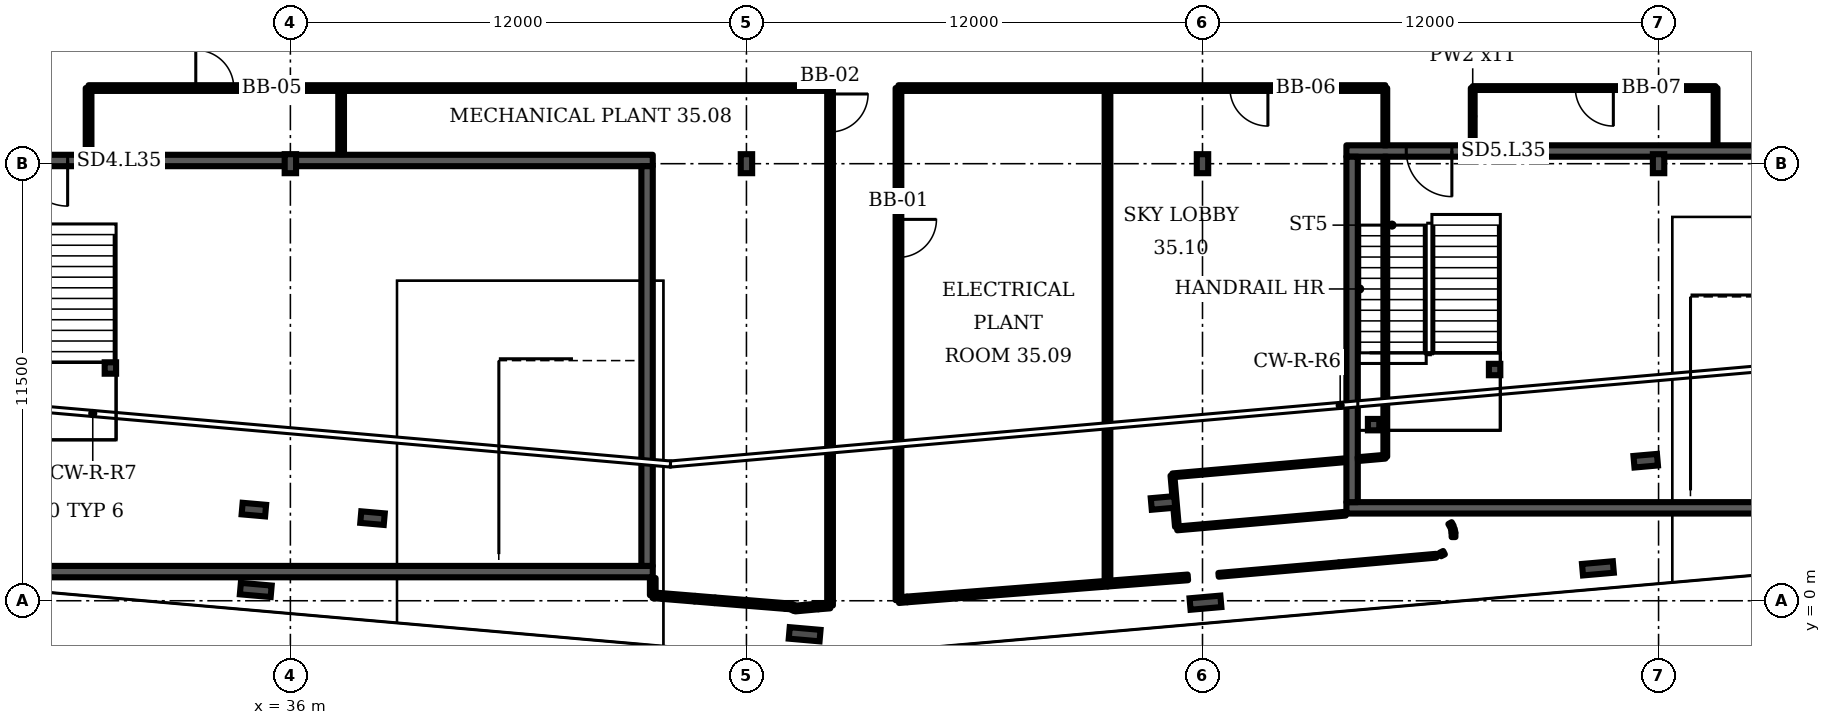
"""IFC4 building model, lengths in metres.
Left out: names, types, materials, properties, quantities, classifications, styles, units other than length and angle.
Written with IfcOpenShell. Run it as: python <this file> out.ifc"""

import sys

from ifc_helpers import new_model, si_unit, direction, frame, frame_2d, origin, origin_2d, place, context, subcontext, project, spatial, rectangle, i_section, extrude, element, fill, save


model = new_model("IFC4")
c1 = context("Model", 3, precision=1e-05, world=origin(), true_north=direction((0.0, 1.0)))
c2 = subcontext(c1, "Body", "Model", "MODEL_VIEW")
j1 = project(units=[si_unit("LENGTHUNIT", "METRE"), si_unit("PLANEANGLEUNIT", "RADIAN")], contexts=[c1])
p1 = place(None, origin())
s1 = spatial("IfcSite", under=j1, at=p1, CompositionType="ELEMENT")
p2 = place(p1, origin())
s2 = spatial("IfcBuilding", under=s1, at=p2, CompositionType="ELEMENT")
p3 = place(p2, frame((0.0, 0.0, 147.1)))
s3 = spatial("IfcBuildingStorey", under=s2, at=p3, CompositionType="ELEMENT", Elevation=147.1)
for number, where, z_axis, x_axis in (
    (1, (35.039, 2.399, 0.0), (0.0, 0.0, 1.0), (-0.087, -0.996, 0.0)),
    (2, (38.161, 2.174, 0.0), (0.0, 0.0, 1.0), (-0.087, -0.996, 0.0)),
    (3, (58.961, 2.573, 0.0), (0.0, 0.0, 1.0), (0.087, -0.996, 0.0)),
    (4, (71.662, 3.685, 0.0), (0.0, 0.0, 1.0), (0.087, -0.996, 0.0)),
):
    element("IfcColumn", number, at=place(p3, frame(where, z_axis=z_axis, x_axis=x_axis)), inside=s3, PredefinedType="COLUMN", context=c2, shape_type="SweptSolid", body=[
        extrude(i_section(OverallWidth=0.305, OverallDepth=0.62, WebThickness=0.021, FlangeThickness=0.04, FilletRadius=0.027, at=origin_2d()), origin(), (0.0, 0.0, 1.0), 4.8),
    ])
for number, where, z_axis, x_axis in (
    (5, (36.0, 11.5, 0.0), (0.0, 0.0, 1.0), (1.0, 0.0, 0.0)),
    (6, (48.0, 11.5, 0.0), (0.0, 0.0, 1.0), (1.0, 0.0, 0.0)),
    (7, (60.0, 11.5, 0.0), (0.0, 0.0, 1.0), (1.0, 0.0, 0.0)),
    (8, (72.0, 11.5, 0.0), (0.0, 0.0, 1.0), (1.0, 0.0, 0.0)),
):
    element("IfcColumn", number, at=place(p3, frame(where, z_axis=z_axis, x_axis=x_axis)), inside=s3, PredefinedType="COLUMN", context=c2, shape_type="SweptSolid", body=[
        extrude(i_section(OverallWidth=0.3, OverallDepth=0.5, WebThickness=0.014, FlangeThickness=0.028, FilletRadius=0.027, at=origin_2d()), origin(), (0.0, 0.0, 1.0), 4.8),
    ])
for number, where, z_axis, x_axis in (
    (9, (35.089, 0.285, 0.0), (0.0, 0.0, 1.0), (-0.087, -0.996, 0.0)),
    (10, (49.531, -0.882, 0.0), (0.0, 0.0, 1.0), (-0.087, -0.996, 0.0)),
    (11, (60.078, -0.051, 0.0), (0.0, 0.0, 1.0), (0.087, -0.996, 0.0)),
    (12, (70.404, 0.853, 0.0), (0.0, 0.0, 1.0), (0.087, -0.996, 0.0)),
):
    element("IfcColumn", number, at=place(p3, frame(where, z_axis=z_axis, x_axis=x_axis)), inside=s3, PredefinedType="COLUMN", context=c2, shape_type="SweptSolid", body=[
        extrude(i_section(OverallWidth=0.303, OverallDepth=0.814, WebThickness=0.021, FlangeThickness=0.04, FilletRadius=0.03, at=origin_2d()), origin(), (0.0, 0.0, 1.0), 4.8),
    ])
p4 = place(p3, frame((27.364, 11.584, 0.0), z_axis=(0.0, 0.0, 1.0), x_axis=(1.0, 0.0, 0.0)))
e13 = element("IfcWall", 13, at=p4, inside=s3, PredefinedType="SHEAR", context=c2, shape_type="SweptSolid", body=[
    extrude(rectangle(XDim=18.171, YDim=0.3, at=frame_2d((9.085, 0.0))), origin(), (0.0, 0.0, 1.0), 4.4),
])
p5 = place(p4, frame((1.575, 0.0, 0.0)))
e14 = element("IfcOpeningElement", 14, at=p5, cuts=e13, PredefinedType="OPENING", context=c2, shape_type="SweptSolid", body=[
    extrude(rectangle(XDim=1.2, YDim=2.1, at=frame_2d((0.6, 1.05))), frame((0.0, 0.16, 0.0), z_axis=(0.0, -1.0, 0.0), x_axis=(1.0, 0.0, 0.0)), (0.0, 0.0, 1.0), 0.32),
])
p6 = place(p3, frame((63.786, 11.834, 0.0), z_axis=(0.0, 0.0, 1.0), x_axis=(1.0, 0.0, 0.0)))
e15 = element("IfcWall", 15, at=p6, inside=s3, PredefinedType="SHEAR", context=c2, shape_type="SweptSolid", body=[
    extrude(rectangle(XDim=13.105, YDim=0.3, at=frame_2d((6.552, 0.0))), origin(), (0.0, 0.0, 1.0), 4.4),
])
p7 = place(p6, frame((1.575, 0.0, 0.0)))
e16 = element("IfcOpeningElement", 16, at=p7, cuts=e15, PredefinedType="OPENING", context=c2, shape_type="SweptSolid", body=[
    extrude(rectangle(XDim=1.2, YDim=2.1, at=frame_2d((0.6, 1.05))), frame((0.0, 0.16, 0.0), z_axis=(0.0, -1.0, 0.0), x_axis=(1.0, 0.0, 0.0)), (0.0, 0.0, 1.0), 0.32),
])
p8 = place(p3, frame((30.69, 11.754, 0.0), z_axis=(0.0, 0.0, 1.0), x_axis=(0.0, 1.0, 0.0)))
e17 = element("IfcWall", 17, at=p8, inside=s3, PredefinedType="PARTITIONING", context=c2, shape_type="SweptSolid", body=[
    extrude(rectangle(XDim=1.736, YDim=0.15, at=frame_2d((0.868, 0.0))), origin(), (0.0, 0.0, 1.0), 4.4),
])
p9 = place(p3, frame((30.69, 13.49, 0.0), z_axis=(0.0, 0.0, 1.0), x_axis=(1.0, 0.0, 0.0)))
e18 = element("IfcWall", 18, at=p9, inside=s3, PredefinedType="PARTITIONING", context=c2, shape_type="SweptSolid", body=[
    extrude(rectangle(XDim=19.51, YDim=0.15, at=frame_2d((9.755, 0.0))), origin(), (0.0, 0.0, 1.0), 4.4),
])
p10 = place(p9, frame((2.821, 0.0, 0.0)))
e19 = element("IfcOpeningElement", 19, at=p10, cuts=e18, PredefinedType="OPENING", context=c2, shape_type="SweptSolid", body=[
    extrude(rectangle(XDim=1.0, YDim=2.1, at=frame_2d((0.5, 1.05))), frame((0.0, 0.085, 0.0), z_axis=(0.0, -1.0, 0.0), x_axis=(1.0, 0.0, 0.0)), (0.0, 0.0, 1.0), 0.17),
])
p11 = place(p3, frame((37.335, 11.754, 0.0), z_axis=(0.0, 0.0, 1.0), x_axis=(0.0, 1.0, 0.0)))
e20 = element("IfcWall", 20, at=p11, inside=s3, PredefinedType="PARTITIONING", context=c2, shape_type="SweptSolid", body=[
    extrude(rectangle(XDim=1.736, YDim=0.15, at=frame_2d((0.868, 0.0))), origin(), (0.0, 0.0, 1.0), 4.4),
])
p12 = place(p3, frame((45.535, 0.145, 0.0), z_axis=(0.0, 0.0, 1.0), x_axis=(0.0, 1.0, 0.0)))
e21 = element("IfcWall", 21, at=p12, inside=s3, PredefinedType="PARTITIONING", context=c2, shape_type="SweptSolid", body=[
    extrude(rectangle(XDim=0.452, YDim=0.15, at=frame_2d((0.226, 0.0))), origin(), (0.0, 0.0, 1.0), 4.4),
])
p13 = place(p3, frame((46.64, 0.055, 0.0), z_axis=(0.0, 0.0, 1.0), x_axis=(-0.996689, 0.081259, 0.0)))
e22 = element("IfcWall", 22, at=p13, inside=s3, PredefinedType="PARTITIONING", context=c2, shape_type="SweptSolid", body=[
    extrude(rectangle(XDim=1.109, YDim=0.15, at=frame_2d((0.554, 0.0))), origin(), (0.0, 0.0, 1.0), 4.4),
])
p14 = place(p3, frame((47.169, 0.011, 0.0), z_axis=(0.0, 0.0, 1.0), x_axis=(-0.99664, 0.081903, 0.0)))
e23 = element("IfcWall", 23, at=p14, inside=s3, PredefinedType="PARTITIONING", context=c2, shape_type="SweptSolid", body=[
    extrude(rectangle(XDim=0.531, YDim=0.15, at=frame_2d((0.265, 0.0))), origin(), (0.0, 0.0, 1.0), 4.4),
])
p15 = place(p3, frame((49.027, -0.139, 0.0), z_axis=(0.0, 0.0, 1.0), x_axis=(-0.996757, 0.080521, 0.0)))
e24 = element("IfcWall", 24, at=p15, inside=s3, PredefinedType="PARTITIONING", context=c2, shape_type="SweptSolid", body=[
    extrude(rectangle(XDim=1.865, YDim=0.15, at=frame_2d((0.932, 0.0))), origin(), (0.0, 0.0, 1.0), 4.4),
])
p16 = place(p3, frame((49.18, -0.15, 0.0), z_axis=(0.0, 0.0, 1.0), x_axis=(-0.997298, 0.073401, 0.0)))
e25 = element("IfcWall", 25, at=p16, inside=s3, PredefinedType="PARTITIONING", context=c2, shape_type="SweptSolid", body=[
    extrude(rectangle(XDim=0.153, YDim=0.15, at=frame_2d((0.077, 0.0))), origin(), (0.0, 0.0, 1.0), 4.4),
])
p17 = place(p3, frame((49.28, -0.205, 0.0), z_axis=(0.0, 0.0, 1.0), x_axis=(-0.884675, 0.466217, 0.0)))
e26 = element("IfcWall", 26, at=p17, inside=s3, PredefinedType="PARTITIONING", context=c2, shape_type="SweptSolid", body=[
    extrude(rectangle(XDim=0.107, YDim=0.15, at=frame_2d((0.054, 0.0))), origin(), (0.0, 0.0, 1.0), 4.4),
])
p18 = place(p3, frame((49.28, -0.205, 0.0), z_axis=(0.0, 0.0, 1.0), x_axis=(0.995928, 0.090104, 0.0)))
e27 = element("IfcWall", 27, at=p18, inside=s3, PredefinedType="PARTITIONING", context=c2, shape_type="SweptSolid", body=[
    extrude(rectangle(XDim=0.612, YDim=0.15, at=frame_2d((0.306, 0.0))), origin(), (0.0, 0.0, 1.0), 4.4),
])
p19 = place(p3, frame((49.89, -0.15, 0.0), z_axis=(0.0, 0.0, 1.0), x_axis=(0.996788, 0.080057, 0.0)))
e28 = element("IfcWall", 28, at=p19, inside=s3, PredefinedType="PARTITIONING", context=c2, shape_type="SweptSolid", body=[
    extrude(rectangle(XDim=0.311, YDim=0.15, at=frame_2d((0.156, 0.0))), origin(), (0.0, 0.0, 1.0), 4.4),
])
p20 = place(p3, frame((50.2, -0.125, 0.0), z_axis=(0.0, 0.0, 1.0), x_axis=(0.0, 1.0, 0.0)))
e29 = element("IfcWall", 29, at=p20, inside=s3, PredefinedType="PARTITIONING", context=c2, shape_type="SweptSolid", body=[
    extrude(rectangle(XDim=13.615, YDim=0.15, at=frame_2d((6.808, 0.0))), origin(), (0.0, 0.0, 1.0), 4.4),
])
p21 = place(p20, frame((12.459, 0.0, 0.0)))
e30 = element("IfcOpeningElement", 30, at=p21, cuts=e29, PredefinedType="OPENING", context=c2, shape_type="SweptSolid", body=[
    extrude(rectangle(XDim=1.0, YDim=2.1, at=frame_2d((0.5, 1.05))), frame((0.0, 0.085, 0.0), z_axis=(0.0, -1.0, 0.0), x_axis=(1.0, 0.0, 0.0)), (0.0, 0.0, 1.0), 0.17),
])
p22 = place(p3, frame((52.0, 0.015, 0.0), z_axis=(0.0, 0.0, 1.0), x_axis=(0.0, 1.0, 0.0)))
e31 = element("IfcWall", 31, at=p22, inside=s3, PredefinedType="PARTITIONING", context=c2, shape_type="SweptSolid", body=[
    extrude(rectangle(XDim=13.475, YDim=0.15, at=frame_2d((6.737, 0.0))), origin(), (0.0, 0.0, 1.0), 4.4),
])
p23 = place(p22, frame((9.02, 0.0, 0.0)))
e32 = element("IfcOpeningElement", 32, at=p23, cuts=e31, PredefinedType="OPENING", context=c2, shape_type="SweptSolid", body=[
    extrude(rectangle(XDim=1.0, YDim=2.1, at=frame_2d((0.5, 1.05))), frame((0.0, 0.085, 0.0), z_axis=(0.0, -1.0, 0.0), x_axis=(1.0, 0.0, 0.0)), (0.0, 0.0, 1.0), 0.17),
])
p24 = place(p3, frame((52.0, 13.49, 0.0), z_axis=(0.0, 0.0, 1.0), x_axis=(1.0, 0.0, 0.0)))
e33 = element("IfcWall", 33, at=p24, inside=s3, PredefinedType="PARTITIONING", context=c2, shape_type="SweptSolid", body=[
    extrude(rectangle(XDim=12.81, YDim=0.15, at=frame_2d((6.405, 0.0))), origin(), (0.0, 0.0, 1.0), 4.4),
])
p25 = place(p24, frame((8.721, 0.0, 0.0)))
e34 = element("IfcOpeningElement", 34, at=p25, cuts=e33, PredefinedType="OPENING", context=c2, shape_type="SweptSolid", body=[
    extrude(rectangle(XDim=1.0, YDim=2.1, at=frame_2d((0.5, 1.05))), frame((0.0, 0.085, 0.0), z_axis=(0.0, -1.0, 0.0), x_axis=(1.0, 0.0, 0.0)), (0.0, 0.0, 1.0), 0.17),
])
p26 = place(p3, frame((52.009, 0.016, 0.0), z_axis=(0.0, 0.0, 1.0), x_axis=(0.99631, 0.085775, 0.0)))
e35 = element("IfcWall", 35, at=p26, inside=s3, PredefinedType="PARTITIONING", context=c2, shape_type="SweptSolid", body=[
    extrude(rectangle(XDim=0.222, YDim=0.15, at=frame_2d((0.111, 0.0))), origin(), (0.0, 0.0, 1.0), 4.4),
])
p27 = place(p3, frame((52.23, 0.035, 0.0), z_axis=(0.0, 0.0, 1.0), x_axis=(0.996917, 0.078512, 0.0)))
e36 = element("IfcWall", 36, at=p27, inside=s3, PredefinedType="PARTITIONING", context=c2, shape_type="SweptSolid", body=[
    extrude(rectangle(XDim=5.286, YDim=0.15, at=frame_2d((2.643, 0.0))), origin(), (0.0, 0.0, 1.0), 4.4),
])
p28 = place(p3, frame((57.5, 0.45, 0.0), z_axis=(0.0, 0.0, 1.0), x_axis=(0.996965, 0.077796, 0.0)))
e37 = element("IfcWall", 37, at=p28, inside=s3, PredefinedType="PARTITIONING", context=c2, shape_type="SweptSolid", body=[
    extrude(rectangle(XDim=2.121, YDim=0.15, at=frame_2d((1.061, 0.0))), origin(), (0.0, 0.0, 1.0), 4.4),
])
p29 = place(p3, frame((57.5, 0.45, 0.0), z_axis=(0.0, 0.0, 1.0), x_axis=(0.0, 1.0, 0.0)))
e38 = element("IfcWall", 38, at=p29, inside=s3, PredefinedType="PARTITIONING", context=c2, shape_type="SweptSolid", body=[
    extrude(rectangle(XDim=13.04, YDim=0.15, at=frame_2d((6.52, 0.0))), origin(), (0.0, 0.0, 1.0), 4.4),
])
p30 = place(p3, frame((59.21, 3.3, 0.0), z_axis=(0.0, 0.0, 1.0), x_axis=(0.996195, 0.087113, 0.0)))
e39 = element("IfcWall", 39, at=p30, inside=s3, PredefinedType="PARTITIONING", context=c2, shape_type="SweptSolid", body=[
    extrude(rectangle(XDim=4.574, YDim=0.1, at=frame_2d((2.287, 0.0))), origin(), (0.0, 0.0, 1.0), 4.4),
])
p31 = place(p3, frame((59.327, 1.948, 0.0), z_axis=(0.0, 0.0, 1.0), x_axis=(-0.087221, 0.996193, 0.0)))
e40 = element("IfcWall", 40, at=p31, inside=s3, PredefinedType="PARTITIONING", context=c2, shape_type="SweptSolid", body=[
    extrude(rectangle(XDim=1.355, YDim=0.1, at=frame_2d((0.677, 0.0))), origin(), (0.0, 0.0, 1.0), 4.4),
])
p32 = place(p3, frame((59.331, 1.903, 0.0), z_axis=(0.0, 0.0, 1.0), x_axis=(0.996196, 0.087174, 0.0)))
e41 = element("IfcWall", 41, at=p32, inside=s3, PredefinedType="PARTITIONING", context=c2, shape_type="SweptSolid", body=[
    extrude(rectangle(XDim=4.453, YDim=0.1, at=frame_2d((2.227, 0.0))), origin(), (0.0, 0.0, 1.0), 4.4),
])
p33 = place(p3, frame((60.422, 0.682, 0.0), z_axis=(0.0, 0.0, 1.0), x_axis=(0.996194, 0.087143, 0.0)))
e42 = element("IfcWall", 42, at=p33, inside=s3, PredefinedType="PARTITIONING", context=c2, shape_type="SweptSolid", body=[
    extrude(rectangle(XDim=3.18, YDim=0.1, at=frame_2d((1.59, 0.0))), origin(), (0.0, 0.0, 1.0), 4.4),
])
p34 = place(p3, frame((63.59, 0.959, 0.0), z_axis=(0.0, 0.0, 1.0), x_axis=(0.996132, 0.08788, 0.0)))
e43 = element("IfcWall", 43, at=p34, inside=s3, PredefinedType="PARTITIONING", context=c2, shape_type="SweptSolid", body=[
    extrude(rectangle(XDim=2.57, YDim=0.1, at=frame_2d((1.285, 0.0))), origin(), (0.0, 0.0, 1.0), 4.4),
])
p35 = place(p3, frame((64.086, 3.727, 0.0), z_axis=(0.0, 0.0, 1.0), x_axis=(0.996178, 0.087384, 0.0)))
e44 = element("IfcWall", 44, at=p35, inside=s3, PredefinedType="PARTITIONING", context=c2, shape_type="SweptSolid", body=[
    extrude(rectangle(XDim=0.726, YDim=0.1, at=frame_2d((0.363, 0.0))), origin(), (0.0, 0.0, 1.0), 4.4),
])
p36 = place(p3, frame((64.81, 3.79, 0.0), z_axis=(0.0, 0.0, 1.0), x_axis=(0.0, 1.0, 0.0)))
e45 = element("IfcWall", 45, at=p36, inside=s3, PredefinedType="PARTITIONING", context=c2, shape_type="SweptSolid", body=[
    extrude(rectangle(XDim=7.894, YDim=0.1, at=frame_2d((3.947, 0.0))), origin(), (0.0, 0.0, 1.0), 4.4),
])
p37 = place(p3, frame((66.255, 1.215, 0.0), z_axis=(0.0, 0.0, 1.0), x_axis=(0.895295, 0.445464, 0.0)))
e46 = element("IfcWall", 46, at=p37, inside=s3, PredefinedType="PARTITIONING", context=c2, shape_type="SweptSolid", body=[
    extrude(rectangle(XDim=0.112, YDim=0.1, at=frame_2d((0.056, 0.0))), origin(), (0.0, 0.0, 1.0), 4.4),
])
p38 = place(p3, frame((66.565, 1.95, 0.0), z_axis=(0.0, 0.0, 1.0), x_axis=(-0.485062, 0.874478, 0.0)))
e47 = element("IfcWall", 47, at=p38, inside=s3, PredefinedType="PARTITIONING", context=c2, shape_type="SweptSolid", body=[
    extrude(rectangle(XDim=0.107, YDim=0.1, at=frame_2d((0.054, 0.0))), origin(), (0.0, 0.0, 1.0), 4.4),
])
p39 = place(p3, frame((66.605, 1.675, 0.0), z_axis=(0.0, 0.0, 1.0), x_axis=(0.0, 1.0, 0.0)))
e48 = element("IfcWall", 48, at=p39, inside=s3, PredefinedType="PARTITIONING", context=c2, shape_type="SweptSolid", body=[
    extrude(rectangle(XDim=0.11, YDim=0.1, at=frame_2d((0.055, 0.0))), origin(), (0.0, 0.0, 1.0), 4.4),
])
p40 = place(p3, frame((66.605, 1.785, 0.0), z_axis=(0.0, 0.0, 1.0), x_axis=(-0.178886, 0.983873, 0.0)))
e49 = element("IfcWall", 49, at=p40, inside=s3, PredefinedType="PARTITIONING", context=c2, shape_type="SweptSolid", body=[
    extrude(rectangle(XDim=0.112, YDim=0.1, at=frame_2d((0.056, 0.0))), origin(), (0.0, 0.0, 1.0), 4.4),
])
p41 = place(p3, frame((67.11, 12.004, 0.0), z_axis=(0.0, 0.0, 1.0), x_axis=(0.0, 1.0, 0.0)))
e50 = element("IfcWall", 50, at=p41, inside=s3, PredefinedType="PARTITIONING", context=c2, shape_type="SweptSolid", body=[
    extrude(rectangle(XDim=1.486, YDim=0.1, at=frame_2d((0.743, 0.0))), origin(), (0.0, 0.0, 1.0), 4.4),
])
p42 = place(p3, frame((67.11, 13.49, 0.0), z_axis=(0.0, 0.0, 1.0), x_axis=(1.0, 0.0, 0.0)))
e51 = element("IfcWall", 51, at=p42, inside=s3, PredefinedType="PARTITIONING", context=c2, shape_type="SweptSolid", body=[
    extrude(rectangle(XDim=6.39, YDim=0.1, at=frame_2d((3.195, 0.0))), origin(), (0.0, 0.0, 1.0), 4.4),
])
p43 = place(p42, frame((2.7, 0.0, 0.0)))
e52 = element("IfcOpeningElement", 52, at=p43, cuts=e51, PredefinedType="OPENING", context=c2, shape_type="SweptSolid", body=[
    extrude(rectangle(XDim=1.0, YDim=2.1, at=frame_2d((0.5, 1.05))), frame((0.0, 0.06, 0.0), z_axis=(0.0, -1.0, 0.0), x_axis=(1.0, 0.0, 0.0)), (0.0, 0.0, 1.0), 0.12),
])
p44 = place(p3, frame((73.5, 12.004, 0.0), z_axis=(0.0, 0.0, 1.0), x_axis=(0.0, 1.0, 0.0)))
e53 = element("IfcWall", 53, at=p44, inside=s3, PredefinedType="PARTITIONING", context=c2, shape_type="SweptSolid", body=[
    extrude(rectangle(XDim=1.486, YDim=0.1, at=frame_2d((0.743, 0.0))), origin(), (0.0, 0.0, 1.0), 4.4),
])
p45 = place(p3, frame((64.81, 11.984, 0.0), z_axis=(0.0, 0.0, 1.0), x_axis=(0.0, 1.0, 0.0)))
e54 = element("IfcWall", 54, at=p45, inside=s3, PredefinedType="PARTITIONING", context=c2, shape_type="SweptSolid", body=[
    extrude(rectangle(XDim=1.506, YDim=0.1, at=frame_2d((0.753, 0.0))), origin(), (0.0, 0.0, 1.0), 4.4),
])
p46 = place(p3, frame((27.364, 0.767, 0.0), z_axis=(0.0, 0.0, 1.0), x_axis=(1.0, 0.0, 0.0)))
e55 = element("IfcWall", 55, at=p46, inside=s3, PredefinedType="SHEAR", context=c2, shape_type="SweptSolid", body=[
    extrude(rectangle(XDim=18.171, YDim=0.3, at=frame_2d((9.085, 0.0))), origin(), (0.0, 0.0, 1.0), 4.4),
])
p47 = place(p3, frame((45.385, 0.917, 0.0), z_axis=(0.0, 0.0, 1.0), x_axis=(0.0, 1.0, 0.0)))
e56 = element("IfcWall", 56, at=p47, inside=s3, PredefinedType="SHEAR", context=c2, shape_type="SweptSolid", body=[
    extrude(rectangle(XDim=10.517, YDim=0.3, at=frame_2d((5.259, 0.0))), origin(), (0.0, 0.0, 1.0), 4.4),
])
p48 = place(p3, frame((63.786, 2.445, 0.0), z_axis=(0.0, 0.0, 1.0), x_axis=(1.0, 0.0, 0.0)))
e57 = element("IfcWall", 57, at=p48, inside=s3, PredefinedType="SHEAR", context=c2, shape_type="SweptSolid", body=[
    extrude(rectangle(XDim=13.105, YDim=0.3, at=frame_2d((6.552, 0.0))), origin(), (0.0, 0.0, 1.0), 4.4),
])
p49 = place(p3, frame((63.936, 2.595, 0.0), z_axis=(0.0, 0.0, 1.0), x_axis=(0.0, 1.0, 0.0)))
e58 = element("IfcWall", 58, at=p49, inside=s3, PredefinedType="SHEAR", context=c2, shape_type="SweptSolid", body=[
    extrude(rectangle(XDim=9.089, YDim=0.3, at=frame_2d((4.544, 0.0))), origin(), (0.0, 0.0, 1.0), 4.4),
])
for number, where, z_axis, x_axis in (
    (59, (31.264, 6.124, 0.0), (0.0, 0.0, 1.0), (1.0, 0.0, 0.0)),
    (60, (64.502, 4.634, 0.0), (0.0, 0.0, 1.0), (1.0, 0.0, 0.0)),
    (61, (67.686, 6.084, 0.0), (0.0, 0.0, 1.0), (1.0, 0.0, 0.0)),
):
    element("IfcColumn", number, at=place(p3, frame(where, z_axis=z_axis, x_axis=x_axis)), inside=s3, PredefinedType="COLUMN", context=c2, shape_type="SweptSolid", body=[
        extrude(rectangle(XDim=0.3, YDim=0.3, at=origin_2d()), origin(), (0.0, 0.0, 1.0), 2.2),
    ])
p50 = place(p5, origin())
e62 = element("IfcDoor", 62, at=p50, inside=s3, OperationType="SINGLE_SWING_RIGHT", PredefinedType="DOOR", context=c2, shape_type="SweptSolid", body=[
    extrude(rectangle(XDim=1.2, YDim=2.1, at=frame_2d((0.6, 1.05))), frame((0.0, 0.025, 0.0), z_axis=(0.0, -1.0, 0.0), x_axis=(1.0, 0.0, 0.0)), (0.0, 0.0, 1.0), 0.05),
])
fill(e14, e62)
p51 = place(p7, origin())
e63 = element("IfcDoor", 63, at=p51, inside=s3, OperationType="SINGLE_SWING_RIGHT", PredefinedType="DOOR", context=c2, shape_type="SweptSolid", body=[
    extrude(rectangle(XDim=1.2, YDim=2.1, at=frame_2d((0.6, 1.05))), frame((0.0, 0.025, 0.0), z_axis=(0.0, -1.0, 0.0), x_axis=(1.0, 0.0, 0.0)), (0.0, 0.0, 1.0), 0.05),
])
fill(e16, e63)
p52 = place(p23, origin())
e64 = element("IfcDoor", 64, at=p52, inside=s3, OperationType="SINGLE_SWING_RIGHT", PredefinedType="DOOR", context=c2, shape_type="SweptSolid", body=[
    extrude(rectangle(XDim=1.0, YDim=2.1, at=frame_2d((0.5, 1.05))), frame((0.0, 0.025, 0.0), z_axis=(0.0, -1.0, 0.0), x_axis=(1.0, 0.0, 0.0)), (0.0, 0.0, 1.0), 0.05),
])
fill(e32, e64)
p53 = place(p21, origin())
e65 = element("IfcDoor", 65, at=p53, inside=s3, OperationType="SINGLE_SWING_RIGHT", PredefinedType="DOOR", context=c2, shape_type="SweptSolid", body=[
    extrude(rectangle(XDim=1.0, YDim=2.1, at=frame_2d((0.5, 1.05))), frame((0.0, 0.025, 0.0), z_axis=(0.0, -1.0, 0.0), x_axis=(1.0, 0.0, 0.0)), (0.0, 0.0, 1.0), 0.05),
])
fill(e30, e65)
p54 = place(p10, origin())
e66 = element("IfcDoor", 66, at=p54, inside=s3, OperationType="SINGLE_SWING_LEFT", PredefinedType="DOOR", context=c2, shape_type="SweptSolid", body=[
    extrude(rectangle(XDim=1.0, YDim=2.1, at=frame_2d((0.5, 1.05))), frame((0.0, 0.025, 0.0), z_axis=(0.0, -1.0, 0.0), x_axis=(1.0, 0.0, 0.0)), (0.0, 0.0, 1.0), 0.05),
])
fill(e19, e66)
p55 = place(p25, origin())
e67 = element("IfcDoor", 67, at=p55, inside=s3, OperationType="SINGLE_SWING_RIGHT", PredefinedType="DOOR", context=c2, shape_type="SweptSolid", body=[
    extrude(rectangle(XDim=1.0, YDim=2.1, at=frame_2d((0.5, 1.05))), frame((0.0, 0.025, 0.0), z_axis=(0.0, -1.0, 0.0), x_axis=(1.0, 0.0, 0.0)), (0.0, 0.0, 1.0), 0.05),
])
fill(e34, e67)
p56 = place(p43, origin())
e68 = element("IfcDoor", 68, at=p56, inside=s3, OperationType="SINGLE_SWING_RIGHT", PredefinedType="DOOR", context=c2, shape_type="SweptSolid", body=[
    extrude(rectangle(XDim=1.0, YDim=2.1, at=frame_2d((0.5, 1.05))), frame((0.0, 0.025, 0.0), z_axis=(0.0, -1.0, 0.0), x_axis=(1.0, 0.0, 0.0)), (0.0, 0.0, 1.0), 0.05),
])
fill(e52, e68)
save(model, sys.argv[1])
